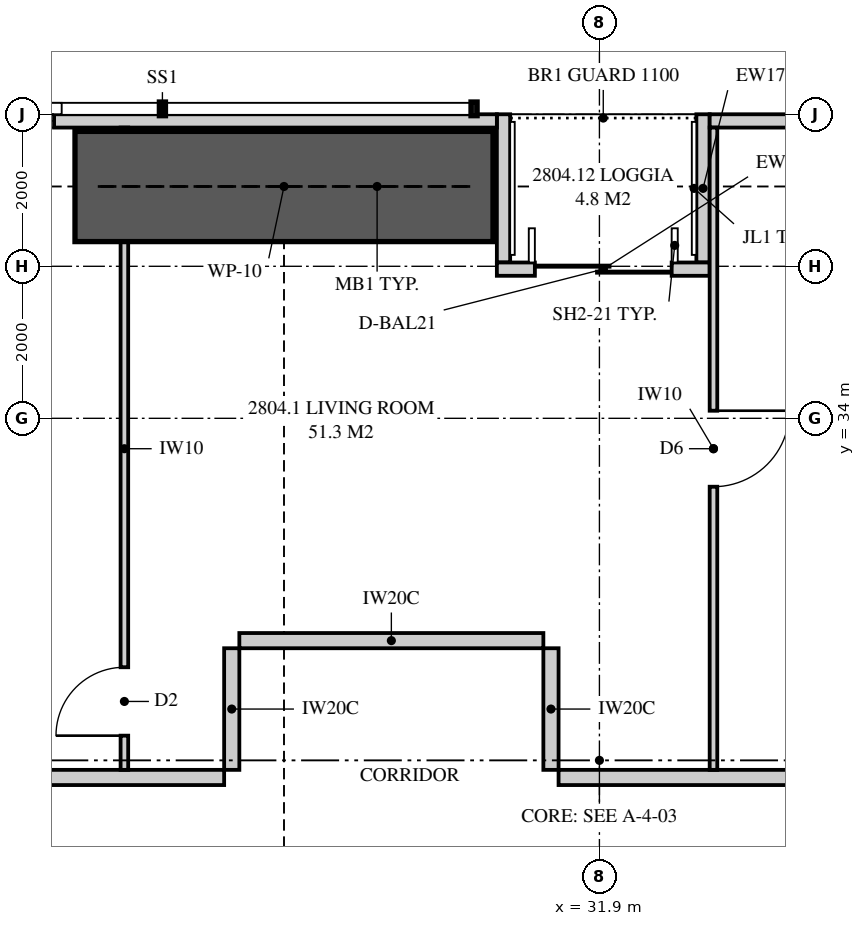
"""IFC4 building model, lengths in metres.
Left out: names, types, materials, properties, quantities, classifications, styles, units other than length and angle.
Written with IfcOpenShell. Run it as: python <this file> out.ifc"""

import sys

from ifc_helpers import new_model, si_unit, direction, frame, frame_2d, origin, place, context, subcontext, project, spatial, polyline, rectangle, outline, extrude, element, fill, save


model = new_model("IFC4")
c1 = context("Model", 3, precision=1e-05, world=origin(), true_north=direction((0.0, 1.0)))
c2 = subcontext(c1, "Body", "Model", "MODEL_VIEW")
j1 = project(units=[si_unit("LENGTHUNIT", "METRE"), si_unit("PLANEANGLEUNIT", "RADIAN")], contexts=[c1])
p1 = place(None, origin())
s1 = spatial("IfcSite", under=j1, at=p1, CompositionType="ELEMENT")
p2 = place(p1, origin())
s2 = spatial("IfcBuilding", under=s1, at=p2, CompositionType="ELEMENT")
p3 = place(p2, frame((0.0, 0.0, 104.85)))
s3 = spatial("IfcBuildingStorey", under=s2, at=p3, CompositionType="ELEMENT", Elevation=104.85)
p4 = place(p3, frame((46.449, 37.913, 0.0), z_axis=(0.0, 0.0, 1.0), x_axis=(-1.0, 0.0, 0.0)))
e1 = element("IfcWall", 1, at=p4, inside=s3, PredefinedType="SOLIDWALL", context=c2, shape_type="SweptSolid", body=[
    extrude(outline(polyline([(0.0, 0.0), (13.098, 0.0), (13.098, 2.15), (7.824, 2.15), (7.824, 3.11), (7.666, 3.11), (7.666, 2.15), (7.62, 2.15), (7.62, 3.11), (0.0, 3.11), (0.0, 0.0)])), frame((0.0, 0.087, 0.0), z_axis=(0.0, -1.0, 0.0), x_axis=(1.0, 0.0, 0.0)), (0.0, 0.0, 1.0), 0.175),
])
p5 = place(p4, frame((2.25, 0.0, 0.4)))
e2 = element("IfcOpeningElement", 2, at=p5, cuts=e1, PredefinedType="OPENING", context=c2, shape_type="SweptSolid", body=[
    extrude(rectangle(XDim=1.2, YDim=1.7, at=frame_2d((0.6, 0.85))), frame((0.0, 0.097, 0.0), z_axis=(0.0, -1.0, 0.0), x_axis=(1.0, 0.0, 0.0)), (0.0, 0.0, 1.0), 0.195),
])
p6 = place(p4, frame((10.798, 0.0, 0.4)))
e3 = element("IfcOpeningElement", 3, at=p6, cuts=e1, PredefinedType="OPENING", context=c2, shape_type="SweptSolid", body=[
    extrude(rectangle(XDim=1.2, YDim=1.7, at=frame_2d((0.6, 0.85))), frame((0.0, 0.097, 0.0), z_axis=(0.0, -1.0, 0.0), x_axis=(1.0, 0.0, 0.0)), (0.0, 0.0, 1.0), 0.195),
])
p7 = place(p3, frame((30.551, 37.913, 0.0), z_axis=(0.0, 0.0, 1.0), x_axis=(-1.0, 0.0, 0.0)))
e4 = element("IfcWall", 4, at=p7, inside=s3, PredefinedType="SOLIDWALL", context=c2, shape_type="SweptSolid", body=[
    extrude(outline(polyline([(0.0, 0.0), (21.499, 0.0), (21.499, 3.11), (13.879, 3.11), (13.879, 2.15), (13.834, 2.15), (13.834, 3.11), (13.676, 3.11), (13.676, 2.15), (0.0, 2.15), (0.0, 0.0)])), frame((0.0, 0.087, 0.0), z_axis=(0.0, -1.0, 0.0), x_axis=(1.0, 0.0, 0.0)), (0.0, 0.0, 1.0), 0.175),
])
p8 = place(p7, frame((5.826, 0.0, 0.4)))
e5 = element("IfcOpeningElement", 5, at=p8, cuts=e4, PredefinedType="OPENING", context=c2, shape_type="SweptSolid", body=[
    extrude(rectangle(XDim=1.8, YDim=1.7, at=frame_2d((0.9, 0.85))), frame((0.0, 0.097, 0.0), z_axis=(0.0, -1.0, 0.0), x_axis=(1.0, 0.0, 0.0)), (0.0, 0.0, 1.0), 0.195),
])
p9 = place(p7, frame((8.993, 0.0, 0.4)))
e6 = element("IfcOpeningElement", 6, at=p9, cuts=e4, PredefinedType="OPENING", context=c2, shape_type="SweptSolid", body=[
    extrude(rectangle(XDim=1.8, YDim=1.7, at=frame_2d((0.9, 0.85))), frame((0.0, 0.097, 0.0), z_axis=(0.0, -1.0, 0.0), x_axis=(1.0, 0.0, 0.0)), (0.0, 0.0, 1.0), 0.195),
])
p10 = place(p7, frame((16.566, 0.0, 0.4)))
e7 = element("IfcOpeningElement", 7, at=p10, cuts=e4, PredefinedType="OPENING", context=c2, shape_type="SweptSolid", body=[
    extrude(rectangle(XDim=1.8, YDim=1.7, at=frame_2d((0.9, 0.85))), frame((0.0, 0.097, 0.0), z_axis=(0.0, -1.0, 0.0), x_axis=(1.0, 0.0, 0.0)), (0.0, 0.0, 1.0), 0.195),
])
p11 = place(p3, frame((33.351, 35.962, 0.0), z_axis=(0.0, 0.0, 1.0), x_axis=(-1.0, 0.0, 0.0)))
e8 = element("IfcWall", 8, at=p11, inside=s3, PredefinedType="SOLIDWALL", context=c2, shape_type="SweptSolid", body=[
    extrude(rectangle(XDim=2.8, YDim=0.175, at=frame_2d((1.4, 0.0))), origin(), (0.0, 0.0, 1.0), 3.11),
])
p12 = place(p11, frame((0.5, 0.0, 0.0)))
e9 = element("IfcOpeningElement", 9, at=p12, cuts=e8, PredefinedType="OPENING", context=c2, shape_type="SweptSolid", body=[
    extrude(rectangle(XDim=1.8, YDim=2.1, at=frame_2d((0.9, 1.05))), frame((0.0, 0.097, 0.0), z_axis=(0.0, -1.0, 0.0), x_axis=(1.0, 0.0, 0.0)), (0.0, 0.0, 1.0), 0.195),
])
for number, where, z_axis, x_axis in (
    (10, (33.263, 38.0, 0.0), (0.0, 0.0, 1.0), (0.0, -1.0, 0.0)),
    (11, (30.638, 38.0, 0.0), (0.0, 0.0, 1.0), (0.0, -1.0, 0.0)),
):
    element("IfcWall", number, at=place(p3, frame(where, z_axis=z_axis, x_axis=x_axis)), inside=s3, PredefinedType="SOLIDWALL", context=c2, shape_type="SweptSolid", body=[
        extrude(outline(polyline([(0.0, 0.0), (1.95, 0.0), (1.95, 3.11), (1.75, 3.11), (1.75, 2.15), (0.15, 2.15), (0.15, 3.11), (0.0, 3.11), (0.0, 0.0)])), frame((0.0, 0.087, 0.0), z_axis=(0.0, -1.0, 0.0), x_axis=(1.0, 0.0, 0.0)), (0.0, 0.0, 1.0), 0.175),
    ])
p13 = place(p3, frame((17.775, 29.275, 0.0), z_axis=(0.0, 0.0, 1.0), x_axis=(1.0, 0.0, 0.0)))
e12 = element("IfcWall", 12, at=p13, inside=s3, PredefinedType="PARTITIONING", context=c2, shape_type="SweptSolid", body=[
    extrude(rectangle(XDim=9.188, YDim=0.2, at=frame_2d((4.594, 0.0))), origin(), (0.0, 0.0, 1.0), 3.11),
])
p14 = place(p13, frame((5.05, 0.0, 0.0)))
e13 = element("IfcOpeningElement", 13, at=p14, cuts=e12, PredefinedType="OPENING", context=c2, shape_type="SweptSolid", body=[
    extrude(rectangle(XDim=1.05, YDim=2.2, at=frame_2d((0.525, 1.1))), frame((0.0, 0.11, 0.0), z_axis=(0.0, -1.0, 0.0), x_axis=(1.0, 0.0, 0.0)), (0.0, 0.0, 1.0), 0.22),
])
p15 = place(p3, frame((25.65, 37.825, 0.0), z_axis=(0.0, 0.0, 1.0), x_axis=(0.0, -1.0, 0.0)))
e14 = element("IfcWall", 14, at=p15, inside=s3, PredefinedType="PARTITIONING", context=c2, shape_type="SweptSolid", body=[
    extrude(outline(polyline([(0.529, 2.15), (0.0, 2.15), (0.0, 0.0), (0.529, 0.0), (0.529, 0.034), (1.021, 0.034), (1.021, 0.0), (8.45, 0.0), (8.45, 3.11), (1.635, 3.11), (1.635, 2.15), (1.021, 2.15), (1.021, 2.116), (0.529, 2.116), (0.529, 2.15)])), frame((0.0, 0.05, 0.0), z_axis=(0.0, -1.0, 0.0), x_axis=(1.0, 0.0, 0.0)), (0.0, 0.0, 1.0), 0.1),
])
p16 = place(p15, frame((7.1, 0.0, 0.0)))
e15 = element("IfcOpeningElement", 15, at=p16, cuts=e14, PredefinedType="OPENING", context=c2, shape_type="SweptSolid", body=[
    extrude(rectangle(XDim=0.9, YDim=2.1, at=frame_2d((0.45, 1.05))), frame((0.0, 0.06, 0.0), z_axis=(0.0, -1.0, 0.0), x_axis=(1.0, 0.0, 0.0)), (0.0, 0.0, 1.0), 0.12),
])
p17 = place(p3, frame((33.401, 37.825, 0.0), z_axis=(0.0, 0.0, 1.0), x_axis=(0.0, -1.0, 0.0)))
e16 = element("IfcWall", 16, at=p17, inside=s3, PredefinedType="PARTITIONING", context=c2, shape_type="SweptSolid", body=[
    extrude(outline(polyline([(0.0, 0.0), (8.45, 0.0), (8.45, 3.11), (1.635, 3.11), (1.635, 2.15), (0.0, 2.15), (0.0, 3.11), (0.0, 0.0)])), frame((0.0, 0.05, 0.0), z_axis=(0.0, -1.0, 0.0), x_axis=(1.0, 0.0, 0.0)), (0.0, 0.0, 1.0), 0.1),
])
p18 = place(p17, frame((3.725, 0.0, 0.0)))
e17 = element("IfcOpeningElement", 17, at=p18, cuts=e16, PredefinedType="OPENING", context=c2, shape_type="SweptSolid", body=[
    extrude(rectangle(XDim=1.0, YDim=2.1, at=frame_2d((0.5, 1.05))), frame((0.0, 0.06, 0.0), z_axis=(0.0, -1.0, 0.0), x_axis=(1.0, 0.0, 0.0)), (0.0, 0.0, 1.0), 0.12),
])
p19 = place(p3, frame((31.363, 29.275, 0.0), z_axis=(0.0, 0.0, 1.0), x_axis=(1.0, 0.0, 0.0)))
e18 = element("IfcWall", 18, at=p19, inside=s3, PredefinedType="PARTITIONING", context=c2, shape_type="SweptSolid", body=[
    extrude(outline(polyline([(0.0, 0.0), (9.188, 0.0), (9.188, 3.11), (7.6, 3.11), (7.6, 2.541), (6.925, 2.541), (6.925, 3.11), (0.0, 3.11), (0.0, 0.0)])), frame((0.0, 0.1, 0.0), z_axis=(0.0, -1.0, 0.0), x_axis=(1.0, 0.0, 0.0)), (0.0, 0.0, 1.0), 0.2),
])
p20 = place(p3, frame((27.163, 31.075, 0.0), z_axis=(0.0, 0.0, 1.0), x_axis=(1.0, 0.0, 0.0)))
e19 = element("IfcWall", 19, at=p20, inside=s3, PredefinedType="PARTITIONING", context=c2, shape_type="SweptSolid", body=[
    extrude(outline(polyline([(0.0, 0.0), (4.0, 0.0), (4.0, 3.11), (0.925, 3.11), (0.925, 2.541), (0.25, 2.541), (0.25, 3.11), (0.0, 3.11), (0.0, 0.0)])), frame((0.0, 0.1, 0.0), z_axis=(0.0, -1.0, 0.0), x_axis=(1.0, 0.0, 0.0)), (0.0, 0.0, 1.0), 0.2),
])
for number, where, z_axis, x_axis in (
    (20, (27.062, 29.375, 0.0), (0.0, 0.0, 1.0), (0.0, 1.0, 0.0)),
    (21, (31.262, 29.375, 0.0), (0.0, 0.0, 1.0), (0.0, 1.0, 0.0)),
):
    element("IfcWall", number, at=place(p3, frame(where, z_axis=z_axis, x_axis=x_axis)), inside=s3, PredefinedType="PARTITIONING", context=c2, shape_type="SweptSolid", body=[
        extrude(rectangle(XDim=1.6, YDim=0.2, at=frame_2d((0.8, 0.0))), origin(), (0.0, 0.0, 1.0), 3.11),
    ])
p21 = place(p3, frame((25.0, 37.05, 0.0), z_axis=(0.0, 0.0, 1.0), x_axis=(1.0, 0.0, 0.0)))
e22 = element("IfcWall", 22, at=p21, inside=s3, PredefinedType="SHEAR", context=c2, shape_type="SweptSolid", body=[
    extrude(rectangle(XDim=5.5, YDim=1.45, at=frame_2d((2.75, 0.0))), origin(), (0.0, 0.0, 1.0), 3.35),
])
p22 = place(p12, origin())
e23 = element("IfcDoor", 23, at=p22, inside=s3, OperationType="SLIDING_TO_LEFT", PredefinedType="DOOR", context=c2, shape_type="SweptSolid", body=[
    extrude(rectangle(XDim=1.8, YDim=2.1, at=frame_2d((0.9, 1.05))), frame((0.0, 0.025, 0.0), z_axis=(0.0, -1.0, 0.0), x_axis=(1.0, 0.0, 0.0)), (0.0, 0.0, 1.0), 0.05),
])
fill(e9, e23)
p23 = place(p8, origin())
e24 = element("IfcWindow", 24, at=p23, inside=s3, PartitioningType="SINGLE_PANEL", PredefinedType="WINDOW", context=c2, shape_type="SweptSolid", body=[
    extrude(rectangle(XDim=1.8, YDim=1.7, at=frame_2d((0.9, 0.85))), frame((0.0, 0.03, 0.0), z_axis=(0.0, -1.0, 0.0), x_axis=(1.0, 0.0, 0.0)), (0.0, 0.0, 1.0), 0.06),
])
fill(e5, e24)
p24 = place(p16, frame((0.9, 0.0, 0.0), z_axis=(0.0, 0.0, 1.0), x_axis=(-1.0, 0.0, 0.0)))
e25 = element("IfcDoor", 25, at=p24, inside=s3, OperationType="SINGLE_SWING_LEFT", PredefinedType="DOOR", context=c2, shape_type="SweptSolid", body=[
    extrude(rectangle(XDim=0.9, YDim=2.1, at=frame_2d((0.45, 1.05))), frame((0.0, 0.025, 0.0), z_axis=(0.0, -1.0, 0.0), x_axis=(1.0, 0.0, 0.0)), (0.0, 0.0, 1.0), 0.05),
])
fill(e15, e25)
p25 = place(p18, origin())
e26 = element("IfcDoor", 26, at=p25, inside=s3, OperationType="SINGLE_SWING_LEFT", PredefinedType="DOOR", context=c2, shape_type="SweptSolid", body=[
    extrude(rectangle(XDim=1.0, YDim=2.1, at=frame_2d((0.5, 1.05))), frame((0.0, 0.025, 0.0), z_axis=(0.0, -1.0, 0.0), x_axis=(1.0, 0.0, 0.0)), (0.0, 0.0, 1.0), 0.05),
])
fill(e17, e26)
save(model, sys.argv[1])
